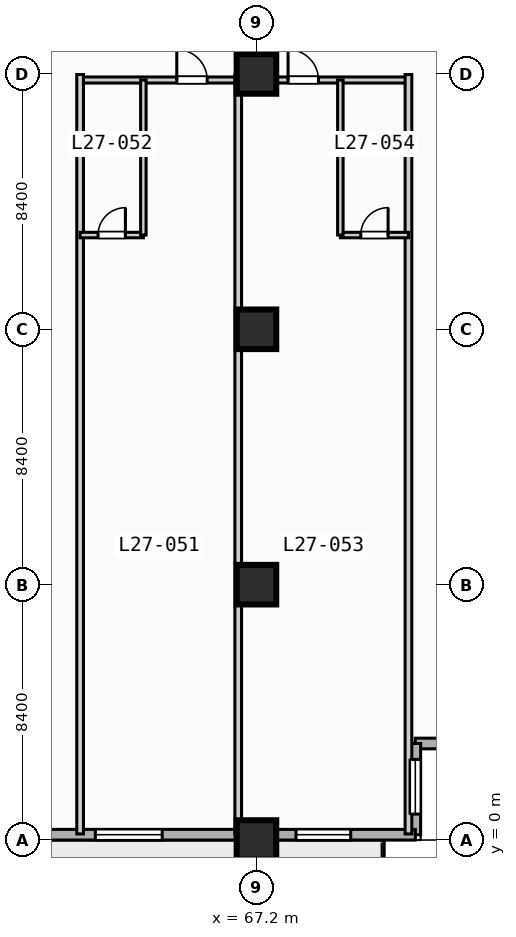
"""IFC4 building model, lengths in metres.
Left out: names, types, materials, properties, quantities, classifications, styles, units other than length and angle.
Written with IfcOpenShell. Run it as: python <this file> out.ifc"""

import sys

from ifc_helpers import new_model, si_unit, direction, frame, frame_2d, origin, origin_2d, place, context, subcontext, project, spatial, rectangle, extrude, element, fill, save


model = new_model("IFC4")
c1 = context("Model", 3, precision=1e-05, world=origin(), true_north=direction((0.0, 1.0)))
c2 = subcontext(c1, "Body", "Model", "MODEL_VIEW")
j1 = project(units=[si_unit("LENGTHUNIT", "METRE"), si_unit("PLANEANGLEUNIT", "RADIAN")], contexts=[c1])
p1 = place(None, origin())
s1 = spatial("IfcSite", under=j1, at=p1, CompositionType="ELEMENT")
p2 = place(p1, origin())
s2 = spatial("IfcBuilding", under=s1, at=p2, CompositionType="ELEMENT")
p3 = place(p2, frame((0.0, 0.0, 115.2)))
s3 = spatial("IfcBuildingStorey", under=s2, at=p3, CompositionType="ELEMENT", Elevation=115.2)
for number, where, z_axis, x_axis in (
    (1, (67.2, 0.0, 0.0), (0.0, 0.0, 1.0), (1.0, 0.0, 0.0)),
    (2, (67.2, 8.4, 0.0), (0.0, 0.0, 1.0), (1.0, 0.0, 0.0)),
    (3, (67.2, 16.8, 0.0), (0.0, 0.0, 1.0), (1.0, 0.0, 0.0)),
    (4, (67.2, 25.2, 0.0), (0.0, 0.0, 1.0), (1.0, 0.0, 0.0)),
):
    element("IfcColumn", number, at=place(p3, frame(where, z_axis=z_axis, x_axis=x_axis)), inside=s3, PredefinedType="COLUMN", context=c2, shape_type="SweptSolid", body=[
        extrude(rectangle(XDim=1.3, YDim=1.3, at=origin_2d()), origin(), (0.0, 0.0, 1.0), 3.8),
    ])
p4 = place(p3, frame((75.425, 3.175, 0.0), z_axis=(0.0, 0.0, 1.0), x_axis=(-1.0, 0.0, 0.0)))
e5 = element("IfcWall", 5, at=p4, inside=s3, PredefinedType="STANDARD", context=c2, shape_type="SweptSolid", body=[
    extrude(rectangle(XDim=3.0, YDim=0.35, at=frame_2d((1.5, 0.0))), origin(), (0.0, 0.0, 1.0), 3.55),
])
p5 = place(p3, frame((72.425, 3.175, 0.0), z_axis=(0.0, 0.0, 1.0), x_axis=(0.0, -1.0, 0.0)))
e6 = element("IfcWall", 6, at=p5, inside=s3, PredefinedType="STANDARD", context=c2, shape_type="SweptSolid", body=[
    extrude(rectangle(XDim=3.0, YDim=0.35, at=frame_2d((1.5, 0.0))), origin(), (0.0, 0.0, 1.0), 3.55),
])
p6 = place(p5, frame((0.522, 0.0, 0.85)))
e7 = element("IfcOpeningElement", 7, at=p6, cuts=e6, PredefinedType="OPENING", context=c2, shape_type="SweptSolid", body=[
    extrude(rectangle(XDim=1.8, YDim=1.8, at=frame_2d((0.9, 0.9))), frame((0.0, 0.185, 0.0), z_axis=(0.0, -1.0, 0.0), x_axis=(1.0, 0.0, 0.0)), (0.0, 0.0, 1.0), 0.37),
])
p7 = place(p3, frame((72.425, 0.175, 0.0), z_axis=(0.0, 0.0, 1.0), x_axis=(-1.0, 0.0, 0.0)))
e8 = element("IfcWall", 8, at=p7, inside=s3, PredefinedType="STANDARD", context=c2, shape_type="SweptSolid", body=[
    extrude(rectangle(XDim=69.25, YDim=0.35, at=frame_2d((34.625, 0.0))), origin(), (0.0, 0.0, 1.0), 3.55),
])
p8 = place(p7, frame((50.725, 0.0, 0.0)))
e9 = element("IfcOpeningElement", 9, at=p8, cuts=e8, PredefinedType="OPENING", context=c2, shape_type="SweptSolid", body=[
    extrude(rectangle(XDim=1.4, YDim=2.2, at=frame_2d((0.7, 1.1))), frame((0.0, 0.185, 0.0), z_axis=(0.0, -1.0, 0.0), x_axis=(1.0, 0.0, 0.0)), (0.0, 0.0, 1.0), 0.37),
])
p9 = place(p7, frame((58.725, 0.0, 0.85)))
e10 = element("IfcOpeningElement", 10, at=p9, cuts=e8, PredefinedType="OPENING", context=c2, shape_type="SweptSolid", body=[
    extrude(rectangle(XDim=2.2, YDim=1.8, at=frame_2d((1.1, 0.9))), frame((0.0, 0.185, 0.0), z_axis=(0.0, -1.0, 0.0), x_axis=(1.0, 0.0, 0.0)), (0.0, 0.0, 1.0), 0.37),
])
p10 = place(p7, frame((41.925, 0.0, 0.85)))
e11 = element("IfcOpeningElement", 11, at=p10, cuts=e8, PredefinedType="OPENING", context=c2, shape_type="SweptSolid", body=[
    extrude(rectangle(XDim=2.2, YDim=1.8, at=frame_2d((1.1, 0.9))), frame((0.0, 0.185, 0.0), z_axis=(0.0, -1.0, 0.0), x_axis=(1.0, 0.0, 0.0)), (0.0, 0.0, 1.0), 0.37),
])
p11 = place(p7, frame((33.525, 0.0, 0.85)))
e12 = element("IfcOpeningElement", 12, at=p11, cuts=e8, PredefinedType="OPENING", context=c2, shape_type="SweptSolid", body=[
    extrude(rectangle(XDim=2.2, YDim=1.8, at=frame_2d((1.1, 0.9))), frame((0.0, 0.185, 0.0), z_axis=(0.0, -1.0, 0.0), x_axis=(1.0, 0.0, 0.0)), (0.0, 0.0, 1.0), 0.37),
])
p12 = place(p7, frame((25.125, 0.0, 0.85)))
e13 = element("IfcOpeningElement", 13, at=p12, cuts=e8, PredefinedType="OPENING", context=c2, shape_type="SweptSolid", body=[
    extrude(rectangle(XDim=2.2, YDim=1.8, at=frame_2d((1.1, 0.9))), frame((0.0, 0.185, 0.0), z_axis=(0.0, -1.0, 0.0), x_axis=(1.0, 0.0, 0.0)), (0.0, 0.0, 1.0), 0.37),
])
p13 = place(p7, frame((8.325, 0.0, 0.85)))
e14 = element("IfcOpeningElement", 14, at=p13, cuts=e8, PredefinedType="OPENING", context=c2, shape_type="SweptSolid", body=[
    extrude(rectangle(XDim=2.2, YDim=1.8, at=frame_2d((1.1, 0.9))), frame((0.0, 0.185, 0.0), z_axis=(0.0, -1.0, 0.0), x_axis=(1.0, 0.0, 0.0)), (0.0, 0.0, 1.0), 0.37),
])
p14 = place(p7, frame((2.125, 0.0, 0.85)))
e15 = element("IfcOpeningElement", 15, at=p14, cuts=e8, PredefinedType="OPENING", context=c2, shape_type="SweptSolid", body=[
    extrude(rectangle(XDim=1.8, YDim=1.8, at=frame_2d((0.9, 0.9))), frame((0.0, 0.185, 0.0), z_axis=(0.0, -1.0, 0.0), x_axis=(1.0, 0.0, 0.0)), (0.0, 0.0, 1.0), 0.37),
])
p15 = place(p3, frame((61.4, 25.0, 0.0), z_axis=(0.0, 0.0, 1.0), x_axis=(1.0, 0.0, 0.0)))
e16 = element("IfcWall", 16, at=p15, inside=s3, PredefinedType="PARTITIONING", context=c2, shape_type="SweptSolid", body=[
    extrude(rectangle(XDim=10.8, YDim=0.2, at=frame_2d((5.4, 0.0))), origin(), (0.0, 0.0, 1.0), 2.8),
])
p16 = place(p15, frame((3.18, 0.0, 0.0)))
e17 = element("IfcOpeningElement", 17, at=p16, cuts=e16, PredefinedType="OPENING", context=c2, shape_type="SweptSolid", body=[
    extrude(rectangle(XDim=1.0, YDim=2.15, at=frame_2d((0.5, 1.075))), frame((0.0, 0.11, 0.0), z_axis=(0.0, -1.0, 0.0), x_axis=(1.0, 0.0, 0.0)), (0.0, 0.0, 1.0), 0.22),
])
p17 = place(p15, frame((6.84, 0.0, 0.0)))
e18 = element("IfcOpeningElement", 18, at=p17, cuts=e16, PredefinedType="OPENING", context=c2, shape_type="SweptSolid", body=[
    extrude(rectangle(XDim=1.0, YDim=2.15, at=frame_2d((0.5, 1.075))), frame((0.0, 0.11, 0.0), z_axis=(0.0, -1.0, 0.0), x_axis=(1.0, 0.0, 0.0)), (0.0, 0.0, 1.0), 0.22),
])
p18 = place(p3, frame((61.4, 0.2, 0.0), z_axis=(0.0, 0.0, 1.0), x_axis=(0.0, 1.0, 0.0)))
e19 = element("IfcWall", 19, at=p18, inside=s3, PredefinedType="PARTITIONING", context=c2, shape_type="SweptSolid", body=[
    extrude(rectangle(XDim=24.98, YDim=0.22, at=frame_2d((12.49, 0.0))), origin(), (0.0, 0.0, 1.0), 3.55),
])
p19 = place(p3, frame((61.4, 19.9, 0.0), z_axis=(0.0, 0.0, 1.0), x_axis=(1.0, 0.0, 0.0)))
e20 = element("IfcWall", 20, at=p19, inside=s3, PredefinedType="PLUMBINGWALL", context=c2, shape_type="SweptSolid", body=[
    extrude(rectangle(XDim=2.08, YDim=0.18, at=frame_2d((1.04, 0.0))), origin(), (0.0, 0.0, 1.0), 3.55),
])
p20 = place(p19, frame((0.59, 0.0, 0.0)))
e21 = element("IfcOpeningElement", 21, at=p20, cuts=e20, PredefinedType="OPENING", context=c2, shape_type="SweptSolid", body=[
    extrude(rectangle(XDim=0.9, YDim=2.1, at=frame_2d((0.45, 1.05))), frame((0.0, 0.1, 0.0), z_axis=(0.0, -1.0, 0.0), x_axis=(1.0, 0.0, 0.0)), (0.0, 0.0, 1.0), 0.2),
])
p21 = place(p3, frame((63.48, 19.9, 0.0), z_axis=(0.0, 0.0, 1.0), x_axis=(0.0, 1.0, 0.0)))
e22 = element("IfcWall", 22, at=p21, inside=s3, PredefinedType="PLUMBINGWALL", context=c2, shape_type="SweptSolid", body=[
    extrude(rectangle(XDim=5.1, YDim=0.18, at=frame_2d((2.55, 0.0))), origin(), (0.0, 0.0, 1.0), 3.55),
])
for number, where, z_axis, x_axis in (
    (23, (66.6, 0.2, 0.0), (0.0, 0.0, 1.0), (0.0, 1.0, 0.0)),
    (24, (72.2, 0.2, 0.0), (0.0, 0.0, 1.0), (0.0, 1.0, 0.0)),
):
    element("IfcWall", number, at=place(p3, frame(where, z_axis=z_axis, x_axis=x_axis)), inside=s3, PredefinedType="PARTITIONING", context=c2, shape_type="SweptSolid", body=[
        extrude(rectangle(XDim=24.98, YDim=0.22, at=frame_2d((12.49, 0.0))), origin(), (0.0, 0.0, 1.0), 3.55),
    ])
p22 = place(p3, frame((69.96, 19.9, 0.0), z_axis=(0.0, 0.0, 1.0), x_axis=(1.0, 0.0, 0.0)))
e25 = element("IfcWall", 25, at=p22, inside=s3, PredefinedType="PLUMBINGWALL", context=c2, shape_type="SweptSolid", body=[
    extrude(rectangle(XDim=2.24, YDim=0.18, at=frame_2d((1.12, 0.0))), origin(), (0.0, 0.0, 1.0), 3.55),
])
p23 = place(p22, frame((0.67, 0.0, 0.0)))
e26 = element("IfcOpeningElement", 26, at=p23, cuts=e25, PredefinedType="OPENING", context=c2, shape_type="SweptSolid", body=[
    extrude(rectangle(XDim=0.9, YDim=2.1, at=frame_2d((0.45, 1.05))), frame((0.0, 0.1, 0.0), z_axis=(0.0, -1.0, 0.0), x_axis=(1.0, 0.0, 0.0)), (0.0, 0.0, 1.0), 0.2),
])
p24 = place(p3, frame((69.96, 19.9, 0.0), z_axis=(0.0, 0.0, 1.0), x_axis=(0.0, 1.0, 0.0)))
e27 = element("IfcWall", 27, at=p24, inside=s3, PredefinedType="PLUMBINGWALL", context=c2, shape_type="SweptSolid", body=[
    extrude(rectangle(XDim=5.1, YDim=0.18, at=frame_2d((2.55, 0.0))), origin(), (0.0, 0.0, 1.0), 3.55),
])
p25 = place(p6, origin())
e28 = element("IfcWindow", 28, at=p25, inside=s3, PartitioningType="SINGLE_PANEL", PredefinedType="WINDOW", context=c2, shape_type="SweptSolid", body=[
    extrude(rectangle(XDim=1.8, YDim=1.8, at=frame_2d((0.9, 0.9))), frame((0.0, 0.03, 0.0), z_axis=(0.0, -1.0, 0.0), x_axis=(1.0, 0.0, 0.0)), (0.0, 0.0, 1.0), 0.06),
])
fill(e7, e28)
p26 = place(p13, origin())
e29 = element("IfcWindow", 29, at=p26, inside=s3, PartitioningType="SINGLE_PANEL", PredefinedType="WINDOW", context=c2, shape_type="SweptSolid", body=[
    extrude(rectangle(XDim=2.2, YDim=1.8, at=frame_2d((1.1, 0.9))), frame((0.0, 0.03, 0.0), z_axis=(0.0, -1.0, 0.0), x_axis=(1.0, 0.0, 0.0)), (0.0, 0.0, 1.0), 0.06),
])
fill(e14, e29)
p27 = place(p14, origin())
e30 = element("IfcWindow", 30, at=p27, inside=s3, PartitioningType="SINGLE_PANEL", PredefinedType="WINDOW", context=c2, shape_type="SweptSolid", body=[
    extrude(rectangle(XDim=1.8, YDim=1.8, at=frame_2d((0.9, 0.9))), frame((0.0, 0.03, 0.0), z_axis=(0.0, -1.0, 0.0), x_axis=(1.0, 0.0, 0.0)), (0.0, 0.0, 1.0), 0.06),
])
fill(e15, e30)
p28 = place(p16, origin())
e31 = element("IfcDoor", 31, at=p28, inside=s3, OperationType="SINGLE_SWING_LEFT", PredefinedType="DOOR", context=c2, shape_type="SweptSolid", body=[
    extrude(rectangle(XDim=1.0, YDim=2.15, at=frame_2d((0.5, 1.075))), frame((0.0, 0.025, 0.0), z_axis=(0.0, -1.0, 0.0), x_axis=(1.0, 0.0, 0.0)), (0.0, 0.0, 1.0), 0.05),
])
fill(e17, e31)
p29 = place(p17, origin())
e32 = element("IfcDoor", 32, at=p29, inside=s3, OperationType="SINGLE_SWING_LEFT", PredefinedType="DOOR", context=c2, shape_type="SweptSolid", body=[
    extrude(rectangle(XDim=1.0, YDim=2.15, at=frame_2d((0.5, 1.075))), frame((0.0, 0.025, 0.0), z_axis=(0.0, -1.0, 0.0), x_axis=(1.0, 0.0, 0.0)), (0.0, 0.0, 1.0), 0.05),
])
fill(e18, e32)
p30 = place(p20, origin())
e33 = element("IfcDoor", 33, at=p30, inside=s3, OperationType="SINGLE_SWING_RIGHT", PredefinedType="DOOR", context=c2, shape_type="SweptSolid", body=[
    extrude(rectangle(XDim=0.9, YDim=2.1, at=frame_2d((0.45, 1.05))), frame((0.0, 0.025, 0.0), z_axis=(0.0, -1.0, 0.0), x_axis=(1.0, 0.0, 0.0)), (0.0, 0.0, 1.0), 0.05),
])
fill(e21, e33)
p31 = place(p23, origin())
e34 = element("IfcDoor", 34, at=p31, inside=s3, OperationType="SINGLE_SWING_RIGHT", PredefinedType="DOOR", context=c2, shape_type="SweptSolid", body=[
    extrude(rectangle(XDim=0.9, YDim=2.1, at=frame_2d((0.45, 1.05))), frame((0.0, 0.025, 0.0), z_axis=(0.0, -1.0, 0.0), x_axis=(1.0, 0.0, 0.0)), (0.0, 0.0, 1.0), 0.05),
])
fill(e26, e34)
save(model, sys.argv[1])
